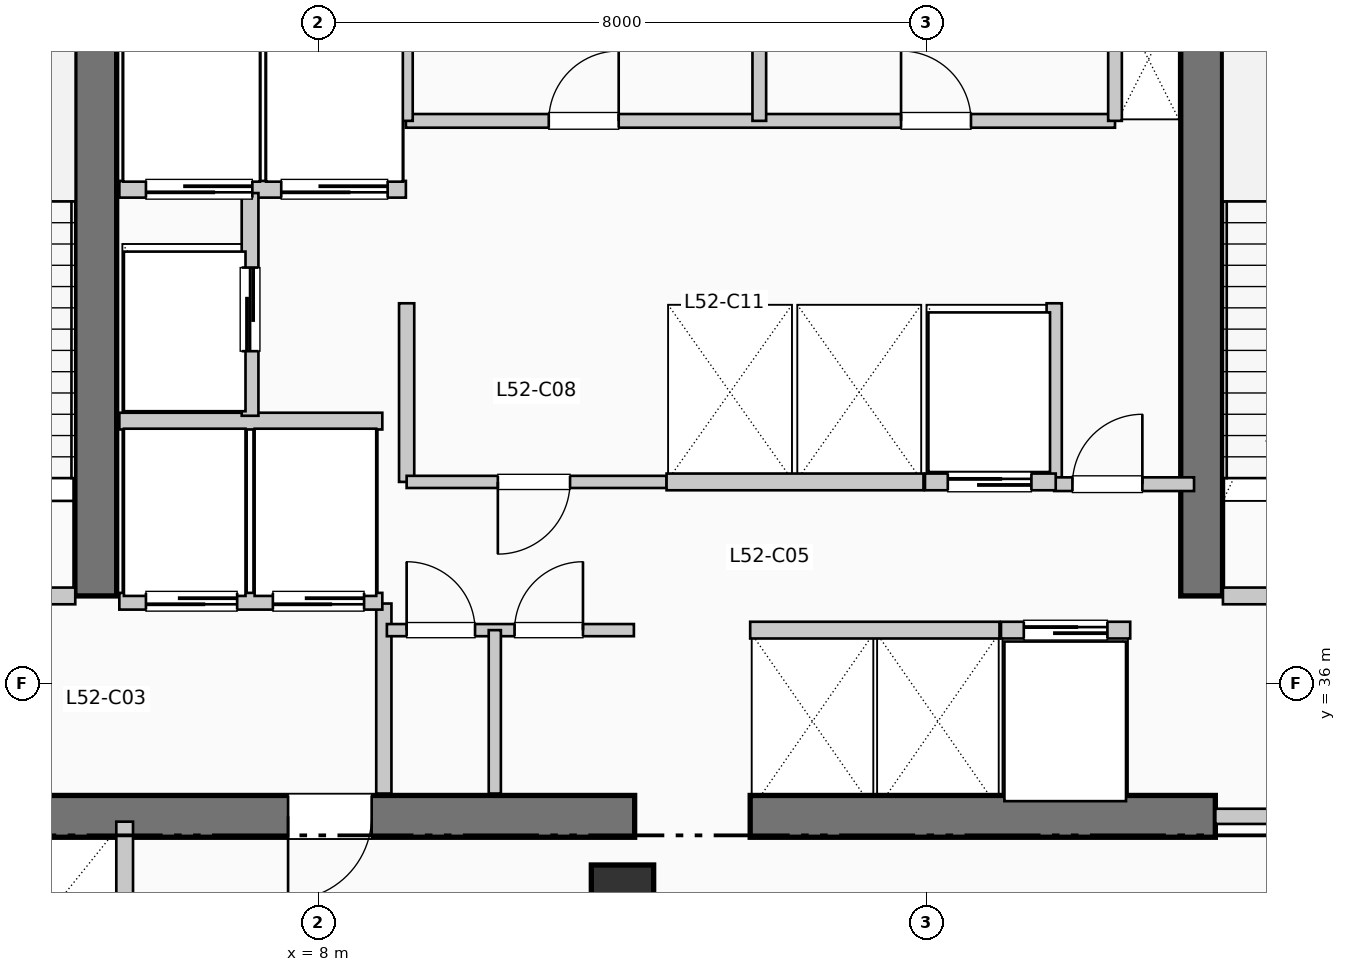
"""IFC4 building model, lengths in metres.
Left out: names, types, materials, properties, quantities, classifications, styles, units other than length and angle.
Written with IfcOpenShell. Run it as: python <this file> out.ifc"""

import sys

from ifc_helpers import new_model, si_unit, direction, frame, frame_2d, origin, origin_2d, place, context, subcontext, project, spatial, rectangle, extrude, element, fill, save


model = new_model("IFC4")
c1 = context("Model", 3, precision=1e-05, world=origin(), true_north=direction((0.0, 1.0)))
c2 = subcontext(c1, "Body", "Model", "MODEL_VIEW")
j1 = project(units=[si_unit("LENGTHUNIT", "METRE"), si_unit("PLANEANGLEUNIT", "RADIAN")], contexts=[c1])
p1 = place(None, origin())
s1 = spatial("IfcSite", under=j1, at=p1, CompositionType="ELEMENT")
p2 = place(p1, origin())
s2 = spatial("IfcBuilding", under=s1, at=p2, CompositionType="ELEMENT")
p3 = place(p2, frame((0.0, 0.0, 215.16)))
s3 = spatial("IfcBuildingStorey", under=s2, at=p3, CompositionType="ELEMENT", Elevation=215.16)
p4 = place(p3, frame((1.45, 34.25, 0.0), z_axis=(0.0, 0.0, 1.0), x_axis=(1.0, 0.0, 0.0)))
e1 = element("IfcWall", 1, at=p4, inside=s3, PredefinedType="SHEAR", context=c2, shape_type="SweptSolid", body=[
    extrude(rectangle(XDim=10.71, YDim=0.55, at=frame_2d((5.355, 0.0))), origin(), (0.0, 0.0, 1.0), 4.62),
])
p5 = place(p4, frame((7.25, 0.0, 0.0), z_axis=(0.0, 0.0, 1.0), x_axis=(-1.0, 0.0, 0.0)))
e2 = element("IfcOpeningElement", 2, at=p5, cuts=e1, PredefinedType="OPENING", context=c2, shape_type="SweptSolid", body=[
    extrude(rectangle(XDim=1.1, YDim=2.15, at=frame_2d((0.55, 1.075))), frame((0.0, 0.285, 0.0), z_axis=(0.0, -1.0, 0.0), x_axis=(1.0, 0.0, 0.0)), (0.0, 0.0, 1.0), 0.57),
])
p6 = place(p3, frame((13.68, 34.25, 0.0), z_axis=(0.0, 0.0, 1.0), x_axis=(1.0, 0.0, 0.0)))
e3 = element("IfcWall", 3, at=p6, inside=s3, PredefinedType="SHEAR", context=c2, shape_type="SweptSolid", body=[
    extrude(rectangle(XDim=6.12, YDim=0.55, at=frame_2d((3.06, 0.0))), origin(), (0.0, 0.0, 1.0), 4.62),
])
for number, where, z_axis, x_axis in (
    (4, (5.07, 37.15, 0.0), (0.0, 0.0, 1.0), (0.0, 1.0, 0.0)),
    (5, (19.62, 37.15, 0.0), (0.0, 0.0, 1.0), (0.0, 1.0, 0.0)),
):
    element("IfcWall", number, at=place(p3, frame(where, z_axis=z_axis, x_axis=x_axis)), inside=s3, PredefinedType="SHEAR", context=c2, shape_type="SweptSolid", body=[
        extrude(rectangle(XDim=7.89, YDim=0.55, at=frame_2d((3.945, 0.0))), origin(), (0.0, 0.0, 1.0), 4.62),
    ])
p7 = place(p3, frame((12.0, 33.2, 0.0), z_axis=(0.0, 0.0, 1.0), x_axis=(1.0, 0.0, 0.0)))
e6 = element("IfcColumn", 6, at=p7, inside=s3, PredefinedType="COLUMN", context=c2, shape_type="SweptSolid", body=[
    extrude(rectangle(XDim=0.82, YDim=0.82, at=origin_2d()), origin(), (0.0, 0.0, 1.0), 4.62),
])
p8 = place(p3, frame((1.65, 37.15, 0.0), z_axis=(0.0, 0.0, 1.0), x_axis=(1.0, 0.0, 0.0)))
e7 = element("IfcWall", 7, at=p8, inside=s3, PredefinedType="PARTITIONING", context=c2, shape_type="SweptSolid", body=[
    extrude(rectangle(XDim=3.15, YDim=0.22, at=frame_2d((1.575, 0.0))), origin(), (0.0, 0.0, 1.0), 4.37),
])
p9 = place(p8, frame((2.05, 0.0, 0.0), z_axis=(0.0, 0.0, 1.0), x_axis=(-1.0, 0.0, 0.0)))
e8 = element("IfcOpeningElement", 8, at=p9, cuts=e7, PredefinedType="OPENING", context=c2, shape_type="SweptSolid", body=[
    extrude(rectangle(XDim=1.05, YDim=2.15, at=frame_2d((0.525, 1.075))), frame((0.0, 0.12, 0.0), z_axis=(0.0, -1.0, 0.0), x_axis=(1.0, 0.0, 0.0)), (0.0, 0.0, 1.0), 0.24),
])
p10 = place(p3, frame((8.86, 34.55, 0.0), z_axis=(0.0, 0.0, 1.0), x_axis=(0.0, 1.0, 0.0)))
e9 = element("IfcWall", 9, at=p10, inside=s3, PredefinedType="PARTITIONING", context=c2, shape_type="SweptSolid", body=[
    extrude(rectangle(XDim=2.5, YDim=0.2, at=frame_2d((1.25, 0.0))), origin(), (0.0, 0.0, 1.0), 4.37),
])
p11 = place(p3, frame((19.9, 37.15, 0.0), z_axis=(0.0, 0.0, 1.0), x_axis=(1.0, 0.0, 0.0)))
e10 = element("IfcWall", 10, at=p11, inside=s3, PredefinedType="PARTITIONING", context=c2, shape_type="SweptSolid", body=[
    extrude(rectangle(XDim=3.15, YDim=0.22, at=frame_2d((1.575, 0.0))), origin(), (0.0, 0.0, 1.0), 4.37),
])
p12 = place(p11, frame((2.05, 0.0, 0.0), z_axis=(0.0, 0.0, 1.0), x_axis=(-1.0, 0.0, 0.0)))
e11 = element("IfcOpeningElement", 11, at=p12, cuts=e10, PredefinedType="OPENING", context=c2, shape_type="SweptSolid", body=[
    extrude(rectangle(XDim=1.05, YDim=2.15, at=frame_2d((0.525, 1.075))), frame((0.0, 0.12, 0.0), z_axis=(0.0, -1.0, 0.0), x_axis=(1.0, 0.0, 0.0)), (0.0, 0.0, 1.0), 0.24),
])
p13 = place(p3, frame((19.8, 34.25, 0.0), z_axis=(0.0, 0.0, 1.0), x_axis=(1.0, 0.0, 0.0)))
e12 = element("IfcWall", 12, at=p13, inside=s3, PredefinedType="PARTITIONING", context=c2, shape_type="SweptSolid", body=[
    extrude(rectangle(XDim=3.25, YDim=0.2, at=frame_2d((1.625, 0.0))), origin(), (0.0, 0.0, 1.0), 4.37),
])
p14 = place(p13, frame((2.15, 0.0, 0.0), z_axis=(0.0, 0.0, 1.0), x_axis=(-1.0, 0.0, 0.0)))
e13 = element("IfcOpeningElement", 13, at=p14, cuts=e12, PredefinedType="OPENING", context=c2, shape_type="SweptSolid", body=[
    extrude(rectangle(XDim=1.1, YDim=2.15, at=frame_2d((0.55, 1.075))), frame((0.0, 0.11, 0.0), z_axis=(0.0, -1.0, 0.0), x_axis=(1.0, 0.0, 0.0)), (0.0, 0.0, 1.0), 0.22),
])
p15 = place(p3, frame((5.38, 37.08, 0.0), z_axis=(0.0, 0.0, 1.0), x_axis=(1.0, 0.0, 0.0)))
e14 = element("IfcWall", 14, at=p15, inside=s3, PredefinedType="PARTITIONING", context=c2, shape_type="SweptSolid", body=[
    extrude(rectangle(XDim=3.46, YDim=0.22, at=frame_2d((1.73, 0.0))), origin(), (0.0, 0.0, 1.0), 4.37),
])
p16 = place(p15, frame((1.55, 0.0, 0.0), z_axis=(0.0, 0.0, 1.0), x_axis=(-1.0, 0.0, 0.0)))
e15 = element("IfcOpeningElement", 15, at=p16, cuts=e14, PredefinedType="OPENING", context=c2, shape_type="SweptSolid", body=[
    extrude(rectangle(XDim=1.2, YDim=2.2, at=frame_2d((0.6, 1.1))), frame((0.0, 0.12, 0.0), z_axis=(0.0, -1.0, 0.0), x_axis=(1.0, 0.0, 0.0)), (0.0, 0.0, 1.0), 0.24),
])
p17 = place(p15, frame((3.22, 0.0, 0.0), z_axis=(0.0, 0.0, 1.0), x_axis=(-1.0, 0.0, 0.0)))
e16 = element("IfcOpeningElement", 16, at=p17, cuts=e14, PredefinedType="OPENING", context=c2, shape_type="SweptSolid", body=[
    extrude(rectangle(XDim=1.2, YDim=2.2, at=frame_2d((0.6, 1.1))), frame((0.0, 0.12, 0.0), z_axis=(0.0, -1.0, 0.0), x_axis=(1.0, 0.0, 0.0)), (0.0, 0.0, 1.0), 0.24),
])
p18 = place(p3, frame((5.38, 39.45, 0.0), z_axis=(0.0, 0.0, 1.0), x_axis=(1.0, 0.0, 0.0)))
e17 = element("IfcWall", 17, at=p18, inside=s3, PredefinedType="PARTITIONING", context=c2, shape_type="SweptSolid", body=[
    extrude(rectangle(XDim=3.46, YDim=0.22, at=frame_2d((1.73, 0.0))), origin(), (0.0, 0.0, 1.0), 4.37),
])
p19 = place(p3, frame((5.38, 42.5, 0.0), z_axis=(0.0, 0.0, 1.0), x_axis=(1.0, 0.0, 0.0)))
e18 = element("IfcWall", 18, at=p19, inside=s3, PredefinedType="PARTITIONING", context=c2, shape_type="SweptSolid", body=[
    extrude(rectangle(XDim=3.77, YDim=0.22, at=frame_2d((1.885, 0.0))), origin(), (0.0, 0.0, 1.0), 4.37),
])
p20 = place(p19, frame((1.75, 0.0, 0.0), z_axis=(0.0, 0.0, 1.0), x_axis=(-1.0, 0.0, 0.0)))
e19 = element("IfcOpeningElement", 19, at=p20, cuts=e18, PredefinedType="OPENING", context=c2, shape_type="SweptSolid", body=[
    extrude(rectangle(XDim=1.4, YDim=2.2, at=frame_2d((0.7, 1.1))), frame((0.0, 0.12, 0.0), z_axis=(0.0, -1.0, 0.0), x_axis=(1.0, 0.0, 0.0)), (0.0, 0.0, 1.0), 0.24),
])
p21 = place(p19, frame((3.53, 0.0, 0.0), z_axis=(0.0, 0.0, 1.0), x_axis=(-1.0, 0.0, 0.0)))
e20 = element("IfcOpeningElement", 20, at=p21, cuts=e18, PredefinedType="OPENING", context=c2, shape_type="SweptSolid", body=[
    extrude(rectangle(XDim=1.4, YDim=2.2, at=frame_2d((0.7, 1.1))), frame((0.0, 0.12, 0.0), z_axis=(0.0, -1.0, 0.0), x_axis=(1.0, 0.0, 0.0)), (0.0, 0.0, 1.0), 0.24),
])
p22 = place(p3, frame((7.1, 39.52, 0.0), z_axis=(0.0, 0.0, 1.0), x_axis=(0.0, 1.0, 0.0)))
e21 = element("IfcWall", 21, at=p22, inside=s3, PredefinedType="PARTITIONING", context=c2, shape_type="SweptSolid", body=[
    extrude(rectangle(XDim=2.93, YDim=0.22, at=frame_2d((1.465, 0.0))), origin(), (0.0, 0.0, 1.0), 4.37),
])
p23 = place(p22, frame((0.85, 0.0, 0.0)))
e22 = element("IfcOpeningElement", 22, at=p23, cuts=e21, PredefinedType="OPENING", context=c2, shape_type="SweptSolid", body=[
    extrude(rectangle(XDim=1.1, YDim=2.2, at=frame_2d((0.55, 1.1))), frame((0.0, 0.12, 0.0), z_axis=(0.0, -1.0, 0.0), x_axis=(1.0, 0.0, 0.0)), (0.0, 0.0, 1.0), 0.24),
])
p24 = place(p3, frame((5.45, 31.8, 0.0), z_axis=(0.0, 0.0, 1.0), x_axis=(0.0, 1.0, 0.0)))
e23 = element("IfcWall", 23, at=p24, inside=s3, PredefinedType="PARTITIONING", context=c2, shape_type="SweptSolid", body=[
    extrude(rectangle(XDim=2.38, YDim=0.22, at=frame_2d((1.19, 0.0))), origin(), (0.0, 0.0, 1.0), 4.37),
])
for number, where, z_axis, x_axis in (
    (24, (9.16, 38.65, 0.0), (0.0, 0.0, 1.0), (0.0, 1.0, 0.0)),
    (25, (17.68, 38.65, 0.0), (0.0, 0.0, 1.0), (0.0, 1.0, 0.0)),
):
    element("IfcWall", number, at=place(p3, frame(where, z_axis=z_axis, x_axis=x_axis)), inside=s3, PredefinedType="PARTITIONING", context=c2, shape_type="SweptSolid", body=[
        extrude(rectangle(XDim=2.35, YDim=0.2, at=frame_2d((1.175, 0.0))), origin(), (0.0, 0.0, 1.0), 4.37),
    ])
p25 = place(p3, frame((17.68, 38.62, 0.0), z_axis=(0.0, 0.0, 1.0), x_axis=(1.0, 0.0, 0.0)))
e26 = element("IfcWall", 26, at=p25, inside=s3, PredefinedType="PARTITIONING", context=c2, shape_type="SweptSolid", body=[
    extrude(rectangle(XDim=1.84, YDim=0.18, at=frame_2d((0.92, 0.0))), origin(), (0.0, 0.0, 1.0), 4.37),
])
p26 = place(p25, frame((0.24, 0.0, 0.0)))
e27 = element("IfcOpeningElement", 27, at=p26, cuts=e26, PredefinedType="OPENING", context=c2, shape_type="SweptSolid", body=[
    extrude(rectangle(XDim=0.92, YDim=2.1, at=frame_2d((0.46, 1.05))), frame((0.0, 0.1, 0.0), z_axis=(0.0, -1.0, 0.0), x_axis=(1.0, 0.0, 0.0)), (0.0, 0.0, 1.0), 0.2),
])
p27 = place(p3, frame((8.9, 36.7, 0.0), z_axis=(0.0, 0.0, 1.0), x_axis=(1.0, 0.0, 0.0)))
e28 = element("IfcWall", 28, at=p27, inside=s3, PredefinedType="PARTITIONING", context=c2, shape_type="SweptSolid", body=[
    extrude(rectangle(XDim=3.25, YDim=0.16, at=frame_2d((1.625, 0.0))), origin(), (0.0, 0.0, 1.0), 4.37),
])
p28 = place(p27, frame((0.26, 0.0, 0.0)))
e29 = element("IfcOpeningElement", 29, at=p28, cuts=e28, PredefinedType="OPENING", context=c2, shape_type="SweptSolid", body=[
    extrude(rectangle(XDim=0.9, YDim=2.15, at=frame_2d((0.45, 1.075))), frame((0.0, 0.09, 0.0), z_axis=(0.0, -1.0, 0.0), x_axis=(1.0, 0.0, 0.0)), (0.0, 0.0, 1.0), 0.18),
])
p29 = place(p27, frame((1.68, 0.0, 0.0)))
e30 = element("IfcOpeningElement", 30, at=p29, cuts=e28, PredefinedType="OPENING", context=c2, shape_type="SweptSolid", body=[
    extrude(rectangle(XDim=0.9, YDim=2.15, at=frame_2d((0.45, 1.075))), frame((0.0, 0.09, 0.0), z_axis=(0.0, -1.0, 0.0), x_axis=(1.0, 0.0, 0.0)), (0.0, 0.0, 1.0), 0.18),
])
p30 = place(p3, frame((10.32, 34.55, 0.0), z_axis=(0.0, 0.0, 1.0), x_axis=(0.0, 1.0, 0.0)))
e31 = element("IfcWall", 31, at=p30, inside=s3, PredefinedType="PARTITIONING", context=c2, shape_type="SweptSolid", body=[
    extrude(rectangle(XDim=2.15, YDim=0.16, at=frame_2d((1.075, 0.0))), origin(), (0.0, 0.0, 1.0), 4.37),
])
p31 = place(p3, frame((9.16, 38.65, 0.0), z_axis=(0.0, 0.0, 1.0), x_axis=(1.0, 0.0, 0.0)))
e32 = element("IfcWall", 32, at=p31, inside=s3, PredefinedType="PARTITIONING", context=c2, shape_type="SweptSolid", body=[
    extrude(rectangle(XDim=3.42, YDim=0.16, at=frame_2d((1.71, 0.0))), origin(), (0.0, 0.0, 1.0), 4.37),
])
p32 = place(p31, frame((2.15, 0.0, 0.0), z_axis=(0.0, 0.0, 1.0), x_axis=(-1.0, 0.0, 0.0)))
e33 = element("IfcOpeningElement", 33, at=p32, cuts=e32, PredefinedType="OPENING", context=c2, shape_type="SweptSolid", body=[
    extrude(rectangle(XDim=0.95, YDim=2.15, at=frame_2d((0.475, 1.075))), frame((0.0, 0.09, 0.0), z_axis=(0.0, -1.0, 0.0), x_axis=(1.0, 0.0, 0.0)), (0.0, 0.0, 1.0), 0.18),
])
p33 = place(p3, frame((13.68, 36.7, 0.0), z_axis=(0.0, 0.0, 1.0), x_axis=(1.0, 0.0, 0.0)))
e34 = element("IfcWall", 34, at=p33, inside=s3, PredefinedType="PARTITIONING", context=c2, shape_type="SweptSolid", body=[
    extrude(rectangle(XDim=3.28, YDim=0.22, at=frame_2d((1.64, 0.0))), origin(), (0.0, 0.0, 1.0), 4.37),
])
p34 = place(p3, frame((12.58, 38.65, 0.0), z_axis=(0.0, 0.0, 1.0), x_axis=(1.0, 0.0, 0.0)))
e35 = element("IfcWall", 35, at=p34, inside=s3, PredefinedType="PARTITIONING", context=c2, shape_type="SweptSolid", body=[
    extrude(rectangle(XDim=3.38, YDim=0.22, at=frame_2d((1.69, 0.0))), origin(), (0.0, 0.0, 1.0), 4.37),
])
p35 = place(p3, frame((16.98, 36.7, 0.0), z_axis=(0.0, 0.0, 1.0), x_axis=(1.0, 0.0, 0.0)))
e36 = element("IfcWall", 36, at=p35, inside=s3, PredefinedType="PARTITIONING", context=c2, shape_type="SweptSolid", body=[
    extrude(rectangle(XDim=1.7, YDim=0.22, at=frame_2d((0.85, 0.0))), origin(), (0.0, 0.0, 1.0), 4.37),
])
p36 = place(p35, frame((0.3, 0.0, 0.0)))
e37 = element("IfcOpeningElement", 37, at=p36, cuts=e36, PredefinedType="OPENING", context=c2, shape_type="SweptSolid", body=[
    extrude(rectangle(XDim=1.1, YDim=2.2, at=frame_2d((0.55, 1.1))), frame((0.0, 0.12, 0.0), z_axis=(0.0, -1.0, 0.0), x_axis=(1.0, 0.0, 0.0)), (0.0, 0.0, 1.0), 0.24),
])
p37 = place(p3, frame((15.98, 38.65, 0.0), z_axis=(0.0, 0.0, 1.0), x_axis=(1.0, 0.0, 0.0)))
e38 = element("IfcWall", 38, at=p37, inside=s3, PredefinedType="PARTITIONING", context=c2, shape_type="SweptSolid", body=[
    extrude(rectangle(XDim=1.72, YDim=0.22, at=frame_2d((0.86, 0.0))), origin(), (0.0, 0.0, 1.0), 4.37),
])
p38 = place(p37, frame((0.3, 0.0, 0.0)))
e39 = element("IfcOpeningElement", 39, at=p38, cuts=e38, PredefinedType="OPENING", context=c2, shape_type="SweptSolid", body=[
    extrude(rectangle(XDim=1.1, YDim=2.2, at=frame_2d((0.55, 1.1))), frame((0.0, 0.12, 0.0), z_axis=(0.0, -1.0, 0.0), x_axis=(1.0, 0.0, 0.0)), (0.0, 0.0, 1.0), 0.24),
])
p39 = place(p3, frame((9.15, 43.4, 0.0), z_axis=(0.0, 0.0, 1.0), x_axis=(1.0, 0.0, 0.0)))
e40 = element("IfcWall", 40, at=p39, inside=s3, PredefinedType="PLUMBINGWALL", context=c2, shape_type="SweptSolid", body=[
    extrude(rectangle(XDim=9.33, YDim=0.18, at=frame_2d((4.665, 0.0))), origin(), (0.0, 0.0, 1.0), 4.37),
])
p40 = place(p39, frame((1.88, 0.0, 0.0)))
e41 = element("IfcOpeningElement", 41, at=p40, cuts=e40, PredefinedType="OPENING", context=c2, shape_type="SweptSolid", body=[
    extrude(rectangle(XDim=0.92, YDim=2.1, at=frame_2d((0.46, 1.05))), frame((0.0, 0.1, 0.0), z_axis=(0.0, -1.0, 0.0), x_axis=(1.0, 0.0, 0.0)), (0.0, 0.0, 1.0), 0.2),
])
p41 = place(p39, frame((6.515, 0.0, 0.0)))
e42 = element("IfcOpeningElement", 42, at=p41, cuts=e40, PredefinedType="OPENING", context=c2, shape_type="SweptSolid", body=[
    extrude(rectangle(XDim=0.92, YDim=2.1, at=frame_2d((0.46, 1.05))), frame((0.0, 0.1, 0.0), z_axis=(0.0, -1.0, 0.0), x_axis=(1.0, 0.0, 0.0)), (0.0, 0.0, 1.0), 0.2),
])
for number, where, z_axis, x_axis in (
    (43, (9.15, 43.4, 0.0), (0.0, 0.0, 1.0), (0.0, 1.0, 0.0)),
    (44, (18.48, 43.4, 0.0), (0.0, 0.0, 1.0), (0.0, 1.0, 0.0)),
    (45, (13.8, 43.4, 0.0), (0.0, 0.0, 1.0), (0.0, 1.0, 0.0)),
):
    element("IfcWall", number, at=place(p3, frame(where, z_axis=z_axis, x_axis=x_axis)), inside=s3, PredefinedType="PLUMBINGWALL", context=c2, shape_type="SweptSolid", body=[
        extrude(rectangle(XDim=1.88, YDim=0.18, at=frame_2d((0.94, 0.0))), origin(), (0.0, 0.0, 1.0), 4.37),
    ])
p42 = place(p5, origin())
e46 = element("IfcDoor", 46, at=p42, inside=s3, OperationType="SINGLE_SWING_LEFT", PredefinedType="DOOR", context=c2, shape_type="SweptSolid", body=[
    extrude(rectangle(XDim=1.1, YDim=2.15, at=frame_2d((0.55, 1.075))), frame((0.0, 0.025, 0.0), z_axis=(0.0, -1.0, 0.0), x_axis=(1.0, 0.0, 0.0)), (0.0, 0.0, 1.0), 0.05),
])
fill(e2, e46)
p43 = place(p16, origin())
e47 = element("IfcDoor", 47, at=p43, inside=s3, OperationType="SLIDING_TO_RIGHT", PredefinedType="DOOR", context=c2, shape_type="SweptSolid", body=[
    extrude(rectangle(XDim=1.2, YDim=2.2, at=frame_2d((0.6, 1.1))), frame((0.0, 0.025, 0.0), z_axis=(0.0, -1.0, 0.0), x_axis=(1.0, 0.0, 0.0)), (0.0, 0.0, 1.0), 0.05),
])
fill(e15, e47)
p44 = place(p17, origin())
e48 = element("IfcDoor", 48, at=p44, inside=s3, OperationType="SLIDING_TO_RIGHT", PredefinedType="DOOR", context=c2, shape_type="SweptSolid", body=[
    extrude(rectangle(XDim=1.2, YDim=2.2, at=frame_2d((0.6, 1.1))), frame((0.0, 0.025, 0.0), z_axis=(0.0, -1.0, 0.0), x_axis=(1.0, 0.0, 0.0)), (0.0, 0.0, 1.0), 0.05),
])
fill(e16, e48)
p45 = place(p20, origin())
e49 = element("IfcDoor", 49, at=p45, inside=s3, OperationType="SLIDING_TO_LEFT", PredefinedType="DOOR", context=c2, shape_type="SweptSolid", body=[
    extrude(rectangle(XDim=1.4, YDim=2.2, at=frame_2d((0.7, 1.1))), frame((0.0, 0.025, 0.0), z_axis=(0.0, -1.0, 0.0), x_axis=(1.0, 0.0, 0.0)), (0.0, 0.0, 1.0), 0.05),
])
fill(e19, e49)
p46 = place(p21, origin())
e50 = element("IfcDoor", 50, at=p46, inside=s3, OperationType="SLIDING_TO_LEFT", PredefinedType="DOOR", context=c2, shape_type="SweptSolid", body=[
    extrude(rectangle(XDim=1.4, YDim=2.2, at=frame_2d((0.7, 1.1))), frame((0.0, 0.025, 0.0), z_axis=(0.0, -1.0, 0.0), x_axis=(1.0, 0.0, 0.0)), (0.0, 0.0, 1.0), 0.05),
])
fill(e20, e50)
p47 = place(p23, origin())
e51 = element("IfcDoor", 51, at=p47, inside=s3, OperationType="SLIDING_TO_LEFT", PredefinedType="DOOR", context=c2, shape_type="SweptSolid", body=[
    extrude(rectangle(XDim=1.1, YDim=2.2, at=frame_2d((0.55, 1.1))), frame((0.0, 0.025, 0.0), z_axis=(0.0, -1.0, 0.0), x_axis=(1.0, 0.0, 0.0)), (0.0, 0.0, 1.0), 0.05),
])
fill(e22, e51)
p48 = place(p26, origin())
e52 = element("IfcDoor", 52, at=p48, inside=s3, OperationType="SINGLE_SWING_RIGHT", PredefinedType="DOOR", context=c2, shape_type="SweptSolid", body=[
    extrude(rectangle(XDim=0.92, YDim=2.1, at=frame_2d((0.46, 1.05))), frame((0.0, 0.025, 0.0), z_axis=(0.0, -1.0, 0.0), x_axis=(1.0, 0.0, 0.0)), (0.0, 0.0, 1.0), 0.05),
])
fill(e27, e52)
p49 = place(p28, origin())
e53 = element("IfcDoor", 53, at=p49, inside=s3, OperationType="SINGLE_SWING_LEFT", PredefinedType="DOOR", context=c2, shape_type="SweptSolid", body=[
    extrude(rectangle(XDim=0.9, YDim=2.15, at=frame_2d((0.45, 1.075))), frame((0.0, 0.025, 0.0), z_axis=(0.0, -1.0, 0.0), x_axis=(1.0, 0.0, 0.0)), (0.0, 0.0, 1.0), 0.05),
])
fill(e29, e53)
p50 = place(p29, origin())
e54 = element("IfcDoor", 54, at=p50, inside=s3, OperationType="SINGLE_SWING_RIGHT", PredefinedType="DOOR", context=c2, shape_type="SweptSolid", body=[
    extrude(rectangle(XDim=0.9, YDim=2.15, at=frame_2d((0.45, 1.075))), frame((0.0, 0.025, 0.0), z_axis=(0.0, -1.0, 0.0), x_axis=(1.0, 0.0, 0.0)), (0.0, 0.0, 1.0), 0.05),
])
fill(e30, e54)
p51 = place(p32, origin())
e55 = element("IfcDoor", 55, at=p51, inside=s3, OperationType="SINGLE_SWING_LEFT", PredefinedType="DOOR", context=c2, shape_type="SweptSolid", body=[
    extrude(rectangle(XDim=0.95, YDim=2.15, at=frame_2d((0.475, 1.075))), frame((0.0, 0.025, 0.0), z_axis=(0.0, -1.0, 0.0), x_axis=(1.0, 0.0, 0.0)), (0.0, 0.0, 1.0), 0.05),
])
fill(e33, e55)
p52 = place(p36, origin())
e56 = element("IfcDoor", 56, at=p52, inside=s3, OperationType="SLIDING_TO_LEFT", PredefinedType="DOOR", context=c2, shape_type="SweptSolid", body=[
    extrude(rectangle(XDim=1.1, YDim=2.2, at=frame_2d((0.55, 1.1))), frame((0.0, 0.025, 0.0), z_axis=(0.0, -1.0, 0.0), x_axis=(1.0, 0.0, 0.0)), (0.0, 0.0, 1.0), 0.05),
])
fill(e37, e56)
p53 = place(p38, origin())
e57 = element("IfcDoor", 57, at=p53, inside=s3, OperationType="SLIDING_TO_LEFT", PredefinedType="DOOR", context=c2, shape_type="SweptSolid", body=[
    extrude(rectangle(XDim=1.1, YDim=2.2, at=frame_2d((0.55, 1.1))), frame((0.0, 0.025, 0.0), z_axis=(0.0, -1.0, 0.0), x_axis=(1.0, 0.0, 0.0)), (0.0, 0.0, 1.0), 0.05),
])
fill(e39, e57)
p54 = place(p40, origin())
e58 = element("IfcDoor", 58, at=p54, inside=s3, OperationType="SINGLE_SWING_RIGHT", PredefinedType="DOOR", context=c2, shape_type="SweptSolid", body=[
    extrude(rectangle(XDim=0.92, YDim=2.1, at=frame_2d((0.46, 1.05))), frame((0.0, 0.025, 0.0), z_axis=(0.0, -1.0, 0.0), x_axis=(1.0, 0.0, 0.0)), (0.0, 0.0, 1.0), 0.05),
])
fill(e41, e58)
p55 = place(p41, origin())
e59 = element("IfcDoor", 59, at=p55, inside=s3, OperationType="SINGLE_SWING_LEFT", PredefinedType="DOOR", context=c2, shape_type="SweptSolid", body=[
    extrude(rectangle(XDim=0.92, YDim=2.1, at=frame_2d((0.46, 1.05))), frame((0.0, 0.025, 0.0), z_axis=(0.0, -1.0, 0.0), x_axis=(1.0, 0.0, 0.0)), (0.0, 0.0, 1.0), 0.05),
])
fill(e42, e59)
save(model, sys.argv[1])
